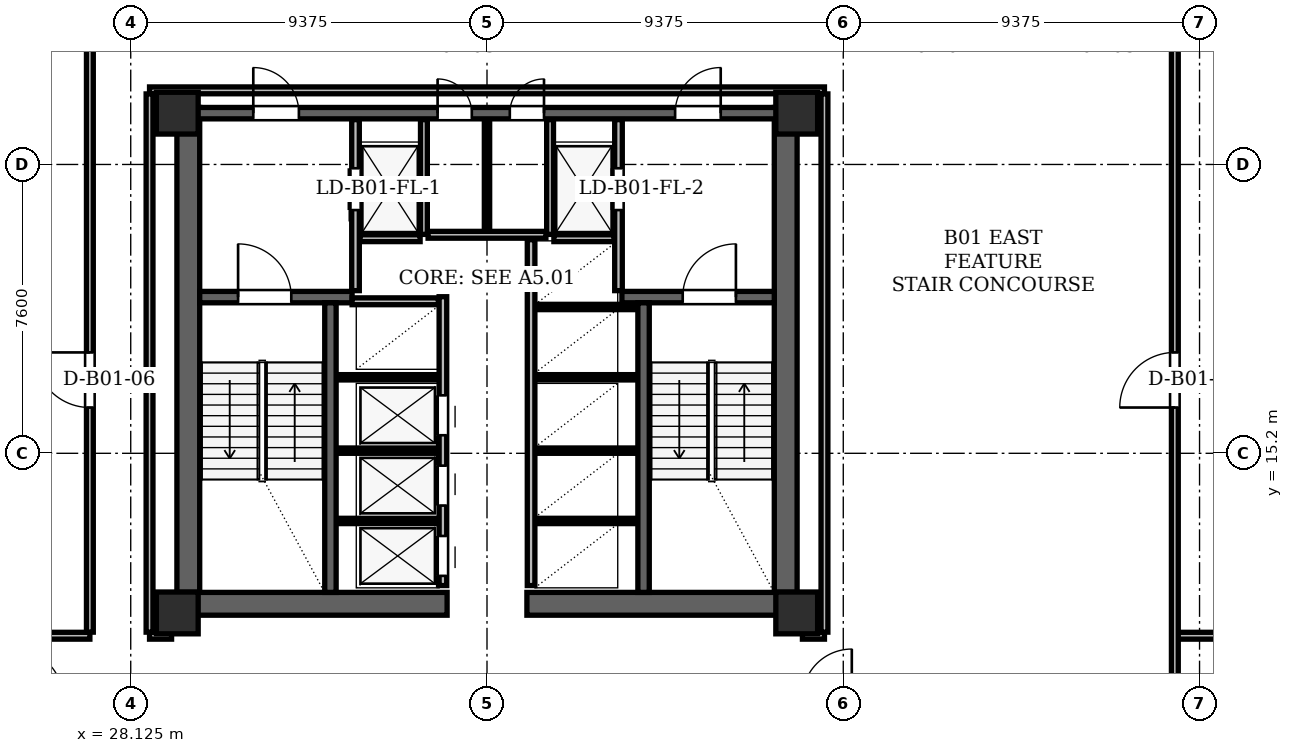
"""IFC4 building model, lengths in metres.
Left out: names, types, materials, properties, quantities, classifications, styles, units other than length and angle.
Written with IfcOpenShell. Run it as: python <this file> out.ifc"""

import sys

from ifc_helpers import new_model, si_unit, direction, frame, frame_2d, origin, origin_2d, place, context, subcontext, project, spatial, rectangle, hollow_rectangle, extrude, element, fill, save


model = new_model("IFC4")
c1 = context("Model", 3, precision=1e-05, world=origin(), true_north=direction((0.0, 1.0)))
c2 = subcontext(c1, "Body", "Model", "MODEL_VIEW")
j1 = project(units=[si_unit("LENGTHUNIT", "METRE"), si_unit("PLANEANGLEUNIT", "RADIAN")], contexts=[c1])
p1 = place(None, origin())
s1 = spatial("IfcSite", under=j1, at=p1, CompositionType="ELEMENT")
p2 = place(p1, origin())
s2 = spatial("IfcBuilding", under=s1, at=p2, CompositionType="ELEMENT")
p3 = place(p2, frame((0.0, 0.0, -4.0)))
s3 = spatial("IfcBuildingStorey", under=s2, at=p3, CompositionType="ELEMENT", Elevation=-4.0)
for number, where, z_axis, x_axis in (
    (1, (29.35, 11.0, 0.0), (0.0, 0.0, 1.0), (1.0, 0.0, 0.0)),
    (2, (45.65, 11.0, 0.0), (0.0, 0.0, 1.0), (1.0, 0.0, 0.0)),
    (3, (45.65, 24.15, 0.0), (0.0, 0.0, 1.0), (1.0, 0.0, 0.0)),
    (4, (29.35, 24.15, 0.0), (0.0, 0.0, 1.0), (1.0, 0.0, 0.0)),
):
    element("IfcColumn", number, at=place(p3, frame(where, z_axis=z_axis, x_axis=x_axis)), inside=s3, PredefinedType="COLUMN", context=c2, shape_type="SweptSolid", body=[
        extrude(hollow_rectangle(XDim=1.1, YDim=1.1, WallThickness=0.09, at=origin_2d()), origin(), (0.0, 0.0, 1.0), 4.0),
    ])
for number, where, z_axis, x_axis in (
    (5, (29.64, 11.0, 0.0), (0.0, 0.0, 1.0), (0.0, 1.0, 0.0)),
    (6, (45.36, 11.0, 0.0), (0.0, 0.0, 1.0), (0.0, 1.0, 0.0)),
):
    element("IfcWall", number, at=place(p3, frame(where, z_axis=z_axis, x_axis=x_axis)), inside=s3, PredefinedType="SHEAR", context=c2, shape_type="SweptSolid", body=[
        extrude(rectangle(XDim=13.3, YDim=0.6, at=frame_2d((6.65, 0.0))), origin(), (0.0, 0.0, 1.0), 3.68),
    ])
for number, where, z_axis, x_axis in (
    (7, (29.35, 11.24, 0.0), (0.0, 0.0, 1.0), (1.0, 0.0, 0.0)),
    (8, (38.55, 11.24, 0.0), (0.0, 0.0, 1.0), (1.0, 0.0, 0.0)),
):
    element("IfcWall", number, at=place(p3, frame(where, z_axis=z_axis, x_axis=x_axis)), inside=s3, PredefinedType="SHEAR", context=c2, shape_type="SweptSolid", body=[
        extrude(rectangle(XDim=7.1, YDim=0.6, at=frame_2d((3.55, 0.0))), origin(), (0.0, 0.0, 1.0), 3.68),
    ])
p4 = place(p3, frame((29.65, 24.15, 0.0), z_axis=(0.0, 0.0, 1.0), x_axis=(1.0, 0.0, 0.0)))
e9 = element("IfcWall", 9, at=p4, inside=s3, PredefinedType="SHEAR", context=c2, shape_type="SweptSolid", body=[
    extrude(rectangle(XDim=15.7, YDim=0.3, at=frame_2d((7.85, 0.0))), origin(), (0.0, 0.0, 1.0), 3.68),
])
p5 = place(p4, frame((1.7, 0.0, 0.0)))
e10 = element("IfcOpeningElement", 10, at=p5, cuts=e9, PredefinedType="OPENING", context=c2, shape_type="SweptSolid", body=[
    extrude(rectangle(XDim=1.2, YDim=2.2, at=frame_2d((0.6, 1.1))), frame((0.0, 0.15, 0.0), z_axis=(0.0, -1.0, 0.0), x_axis=(1.0, 0.0, 0.0)), (0.0, 0.0, 1.0), 0.3),
])
p6 = place(p4, frame((12.8, 0.0, 0.0)))
e11 = element("IfcOpeningElement", 11, at=p6, cuts=e9, PredefinedType="OPENING", context=c2, shape_type="SweptSolid", body=[
    extrude(rectangle(XDim=1.2, YDim=2.2, at=frame_2d((0.6, 1.1))), frame((0.0, 0.15, 0.0), z_axis=(0.0, -1.0, 0.0), x_axis=(1.0, 0.0, 0.0)), (0.0, 0.0, 1.0), 0.3),
])
p7 = place(p4, frame((6.55, 0.0, 0.0)))
e12 = element("IfcOpeningElement", 12, at=p7, cuts=e9, PredefinedType="OPENING", context=c2, shape_type="SweptSolid", body=[
    extrude(rectangle(XDim=0.9, YDim=2.05, at=frame_2d((0.45, 1.025))), frame((0.0, 0.15, 0.0), z_axis=(0.0, -1.0, 0.0), x_axis=(1.0, 0.0, 0.0)), (0.0, 0.0, 1.0), 0.3),
])
p8 = place(p4, frame((8.45, 0.0, 0.0)))
e13 = element("IfcOpeningElement", 13, at=p8, cuts=e9, PredefinedType="OPENING", context=c2, shape_type="SweptSolid", body=[
    extrude(rectangle(XDim=0.9, YDim=2.05, at=frame_2d((0.45, 1.025))), frame((0.0, 0.15, 0.0), z_axis=(0.0, -1.0, 0.0), x_axis=(1.0, 0.0, 0.0)), (0.0, 0.0, 1.0), 0.3),
])
p9 = place(p3, frame((29.94, 19.31, 0.0), z_axis=(0.0, 0.0, 1.0), x_axis=(1.0, 0.0, 0.0)))
e14 = element("IfcWall", 14, at=p9, inside=s3, PredefinedType="SHEAR", context=c2, shape_type="SweptSolid", body=[
    extrude(rectangle(XDim=4.01, YDim=0.3, at=frame_2d((2.005, 0.0))), origin(), (0.0, 0.0, 1.0), 3.68),
])
p10 = place(p9, frame((1.01, 0.0, 0.0)))
e15 = element("IfcOpeningElement", 15, at=p10, cuts=e14, PredefinedType="OPENING", context=c2, shape_type="SweptSolid", body=[
    extrude(rectangle(XDim=1.4, YDim=2.2, at=frame_2d((0.7, 1.1))), frame((0.0, 0.15, 0.0), z_axis=(0.0, -1.0, 0.0), x_axis=(1.0, 0.0, 0.0)), (0.0, 0.0, 1.0), 0.3),
])
p11 = place(p3, frame((41.05, 19.31, 0.0), z_axis=(0.0, 0.0, 1.0), x_axis=(1.0, 0.0, 0.0)))
e16 = element("IfcWall", 16, at=p11, inside=s3, PredefinedType="SHEAR", context=c2, shape_type="SweptSolid", body=[
    extrude(rectangle(XDim=4.01, YDim=0.3, at=frame_2d((2.005, 0.0))), origin(), (0.0, 0.0, 1.0), 3.68),
])
p12 = place(p11, frame((1.6, 0.0, 0.0)))
e17 = element("IfcOpeningElement", 17, at=p12, cuts=e16, PredefinedType="OPENING", context=c2, shape_type="SweptSolid", body=[
    extrude(rectangle(XDim=1.4, YDim=2.2, at=frame_2d((0.7, 1.1))), frame((0.0, 0.15, 0.0), z_axis=(0.0, -1.0, 0.0), x_axis=(1.0, 0.0, 0.0)), (0.0, 0.0, 1.0), 0.3),
])
for number, where, z_axis, x_axis in (
    (18, (33.38, 11.54, 0.0), (0.0, 0.0, 1.0), (0.0, 1.0, 0.0)),
    (19, (41.62, 11.54, 0.0), (0.0, 0.0, 1.0), (0.0, 1.0, 0.0)),
):
    element("IfcWall", number, at=place(p3, frame(where, z_axis=z_axis, x_axis=x_axis)), inside=s3, PredefinedType="SHEAR", context=c2, shape_type="SweptSolid", body=[
        extrude(rectangle(XDim=7.62, YDim=0.3, at=frame_2d((3.81, 0.0))), origin(), (0.0, 0.0, 1.0), 3.68),
    ])
p13 = place(p3, frame((34.04, 19.48, 0.0), z_axis=(0.0, 0.0, 1.0), x_axis=(0.0, 1.0, 0.0)))
e20 = element("IfcWall", 20, at=p13, inside=s3, PredefinedType="PARTITIONING", context=c2, shape_type="SweptSolid", body=[
    extrude(rectangle(XDim=4.5, YDim=0.2, at=frame_2d((2.25, 0.0))), origin(), (0.0, 0.0, 1.0), 2.72),
])
p14 = place(p13, frame((2.12, 0.0, 0.0)))
e21 = element("IfcOpeningElement", 21, at=p14, cuts=e20, PredefinedType="OPENING", context=c2, shape_type="SweptSolid", body=[
    extrude(rectangle(XDim=1.1, YDim=2.2, at=frame_2d((0.55, 1.1))), frame((0.0, 0.1, 0.0), z_axis=(0.0, -1.0, 0.0), x_axis=(1.0, 0.0, 0.0)), (0.0, 0.0, 1.0), 0.2),
])
p15 = place(p3, frame((35.84, 20.96, 0.0), z_axis=(0.0, 0.0, 1.0), x_axis=(0.0, 1.0, 0.0)))
e22 = element("IfcWall", 22, at=p15, inside=s3, PredefinedType="PARTITIONING", context=c2, shape_type="SweptSolid", body=[
    extrude(rectangle(XDim=3.02, YDim=0.18, at=frame_2d((1.51, 0.0))), origin(), (0.0, 0.0, 1.0), 2.72),
])
p16 = place(p3, frame((34.16, 20.86, 0.0), z_axis=(0.0, 0.0, 1.0), x_axis=(1.0, 0.0, 0.0)))
e23 = element("IfcWall", 23, at=p16, inside=s3, PredefinedType="PARTITIONING", context=c2, shape_type="SweptSolid", body=[
    extrude(rectangle(XDim=1.58, YDim=0.18, at=frame_2d((0.79, 0.0))), origin(), (0.0, 0.0, 1.0), 3.68),
])
p17 = place(p3, frame((40.96, 19.48, 0.0), z_axis=(0.0, 0.0, 1.0), x_axis=(0.0, 1.0, 0.0)))
e24 = element("IfcWall", 24, at=p17, inside=s3, PredefinedType="PARTITIONING", context=c2, shape_type="SweptSolid", body=[
    extrude(rectangle(XDim=4.5, YDim=0.2, at=frame_2d((2.25, 0.0))), origin(), (0.0, 0.0, 1.0), 2.72),
])
p18 = place(p17, frame((2.12, 0.0, 0.0)))
e25 = element("IfcOpeningElement", 25, at=p18, cuts=e24, PredefinedType="OPENING", context=c2, shape_type="SweptSolid", body=[
    extrude(rectangle(XDim=1.1, YDim=2.2, at=frame_2d((0.55, 1.1))), frame((0.0, 0.1, 0.0), z_axis=(0.0, -1.0, 0.0), x_axis=(1.0, 0.0, 0.0)), (0.0, 0.0, 1.0), 0.2),
])
p19 = place(p3, frame((39.16, 20.96, 0.0), z_axis=(0.0, 0.0, 1.0), x_axis=(0.0, 1.0, 0.0)))
e26 = element("IfcWall", 26, at=p19, inside=s3, PredefinedType="PARTITIONING", context=c2, shape_type="SweptSolid", body=[
    extrude(rectangle(XDim=3.02, YDim=0.18, at=frame_2d((1.51, 0.0))), origin(), (0.0, 0.0, 1.0), 2.72),
])
p20 = place(p3, frame((39.26, 20.86, 0.0), z_axis=(0.0, 0.0, 1.0), x_axis=(1.0, 0.0, 0.0)))
e27 = element("IfcWall", 27, at=p20, inside=s3, PredefinedType="PARTITIONING", context=c2, shape_type="SweptSolid", body=[
    extrude(rectangle(XDim=1.58, YDim=0.18, at=frame_2d((0.79, 0.0))), origin(), (0.0, 0.0, 1.0), 3.68),
])
p21 = place(p3, frame((36.34, 11.72, 0.0), z_axis=(0.0, 0.0, 1.0), x_axis=(0.0, 1.0, 0.0)))
e28 = element("IfcWall", 28, at=p21, inside=s3, PredefinedType="PARTITIONING", context=c2, shape_type="SweptSolid", body=[
    extrude(rectangle(XDim=7.6, YDim=0.2, at=frame_2d((3.8, 0.0))), origin(), (0.0, 0.0, 1.0), 3.68),
])
p22 = place(p21, frame((0.255, 0.0, 0.0)))
e29 = element("IfcOpeningElement", 29, at=p22, cuts=e28, PredefinedType="OPENING", context=c2, shape_type="SweptSolid", body=[
    extrude(rectangle(XDim=1.05, YDim=2.15, at=frame_2d((0.525, 1.075))), frame((0.0, 0.1, 0.0), z_axis=(0.0, -1.0, 0.0), x_axis=(1.0, 0.0, 0.0)), (0.0, 0.0, 1.0), 0.2),
])
p23 = place(p21, frame((2.105, 0.0, 0.0)))
e30 = element("IfcOpeningElement", 30, at=p23, cuts=e28, PredefinedType="OPENING", context=c2, shape_type="SweptSolid", body=[
    extrude(rectangle(XDim=1.05, YDim=2.15, at=frame_2d((0.525, 1.075))), frame((0.0, 0.1, 0.0), z_axis=(0.0, -1.0, 0.0), x_axis=(1.0, 0.0, 0.0)), (0.0, 0.0, 1.0), 0.2),
])
p24 = place(p21, frame((3.955, 0.0, 0.0)))
e31 = element("IfcOpeningElement", 31, at=p24, cuts=e28, PredefinedType="OPENING", context=c2, shape_type="SweptSolid", body=[
    extrude(rectangle(XDim=1.05, YDim=2.15, at=frame_2d((0.525, 1.075))), frame((0.0, 0.1, 0.0), z_axis=(0.0, -1.0, 0.0), x_axis=(1.0, 0.0, 0.0)), (0.0, 0.0, 1.0), 0.2),
])
p25 = place(p3, frame((33.95, 19.2, 0.0), z_axis=(0.0, 0.0, 1.0), x_axis=(1.0, 0.0, 0.0)))
e32 = element("IfcWall", 32, at=p25, inside=s3, PredefinedType="PARTITIONING", context=c2, shape_type="SweptSolid", body=[
    extrude(rectangle(XDim=2.27, YDim=0.18, at=frame_2d((1.135, 0.0))), origin(), (0.0, 0.0, 1.0), 3.68),
])
for number, where, z_axis, x_axis in (
    (33, (33.56, 13.42, 0.0), (0.0, 0.0, 1.0), (1.0, 0.0, 0.0)),
    (34, (33.56, 15.27, 0.0), (0.0, 0.0, 1.0), (1.0, 0.0, 0.0)),
    (35, (33.56, 17.2, 0.0), (0.0, 0.0, 1.0), (1.0, 0.0, 0.0)),
):
    element("IfcWall", number, at=place(p3, frame(where, z_axis=z_axis, x_axis=x_axis)), inside=s3, PredefinedType="PARTITIONING", context=c2, shape_type="SweptSolid", body=[
        extrude(rectangle(XDim=2.66, YDim=0.14, at=frame_2d((1.33, 0.0))), origin(), (0.0, 0.0, 1.0), 3.68),
    ])
p26 = place(p3, frame((38.66, 11.72, 0.0), z_axis=(0.0, 0.0, 1.0), x_axis=(0.0, 1.0, 0.0)))
e36 = element("IfcWall", 36, at=p26, inside=s3, PredefinedType="PARTITIONING", context=c2, shape_type="SweptSolid", body=[
    extrude(rectangle(XDim=9.1, YDim=0.2, at=frame_2d((4.55, 0.0))), origin(), (0.0, 0.0, 1.0), 3.68),
])
for number, where, z_axis, x_axis in (
    (37, (38.78, 13.42, 0.0), (0.0, 0.0, 1.0), (1.0, 0.0, 0.0)),
    (38, (38.78, 15.27, 0.0), (0.0, 0.0, 1.0), (1.0, 0.0, 0.0)),
    (39, (38.78, 17.2, 0.0), (0.0, 0.0, 1.0), (1.0, 0.0, 0.0)),
    (40, (38.78, 19.05, 0.0), (0.0, 0.0, 1.0), (1.0, 0.0, 0.0)),
):
    element("IfcWall", number, at=place(p3, frame(where, z_axis=z_axis, x_axis=x_axis)), inside=s3, PredefinedType="PARTITIONING", context=c2, shape_type="SweptSolid", body=[
        extrude(rectangle(XDim=2.66, YDim=0.14, at=frame_2d((1.33, 0.0))), origin(), (0.0, 0.0, 1.0), 3.68),
    ])
p27 = place(p3, frame((35.95, 20.95, 0.0), z_axis=(0.0, 0.0, 1.0), x_axis=(1.0, 0.0, 0.0)))
e41 = element("IfcWall", 41, at=p27, inside=s3, PredefinedType="PARTITIONING", context=c2, shape_type="SweptSolid", body=[
    extrude(rectangle(XDim=3.1, YDim=0.18, at=frame_2d((1.55, 0.0))), origin(), (0.0, 0.0, 1.0), 3.68),
])
p28 = place(p3, frame((37.5, 21.06, 0.0), z_axis=(0.0, 0.0, 1.0), x_axis=(0.0, 1.0, 0.0)))
e42 = element("IfcWall", 42, at=p28, inside=s3, PredefinedType="PARTITIONING", context=c2, shape_type="SweptSolid", body=[
    extrude(rectangle(XDim=2.92, YDim=0.14, at=frame_2d((1.46, 0.0))), origin(), (0.0, 0.0, 1.0), 2.72),
])
p29 = place(p3, frame((16.25, 10.4, 0.0), z_axis=(0.0, 0.0, 1.0), x_axis=(1.0, 0.0, 0.0)))
e43 = element("IfcWall", 43, at=p29, inside=s3, PredefinedType="PARTITIONING", context=c2, shape_type="SweptSolid", body=[
    extrude(rectangle(XDim=10.8, YDim=0.18, at=frame_2d((5.4, 0.0))), origin(), (0.0, 0.0, 1.0), 3.68),
])
for number, where, z_axis, x_axis in (
    (44, (28.62, 10.4, 0.0), (0.0, 0.0, 1.0), (1.0, 0.0, 0.0)),
    (45, (45.8, 10.4, 0.0), (0.0, 0.0, 1.0), (1.0, 0.0, 0.0)),
):
    element("IfcWall", number, at=place(p3, frame(where, z_axis=z_axis, x_axis=x_axis)), inside=s3, PredefinedType="PARTITIONING", context=c2, shape_type="SweptSolid", body=[
        extrude(rectangle(XDim=0.58, YDim=0.18, at=frame_2d((0.29, 0.0))), origin(), (0.0, 0.0, 1.0), 2.743),
    ])
p30 = place(p3, frame((55.6, 10.4, 0.0), z_axis=(0.0, 0.0, 1.0), x_axis=(1.0, 0.0, 0.0)))
e46 = element("IfcWall", 46, at=p30, inside=s3, PredefinedType="PARTITIONING", context=c2, shape_type="SweptSolid", body=[
    extrude(rectangle(XDim=22.121, YDim=0.18, at=frame_2d((11.061, 0.0))), origin(), (0.0, 0.0, 1.0), 2.743),
])
p31 = place(p3, frame((28.62, 24.75, 0.0), z_axis=(0.0, 0.0, 1.0), x_axis=(1.0, 0.0, 0.0)))
e47 = element("IfcWall", 47, at=p31, inside=s3, PredefinedType="PARTITIONING", context=c2, shape_type="SweptSolid", body=[
    extrude(rectangle(XDim=17.76, YDim=0.18, at=frame_2d((8.88, 0.0))), origin(), (0.0, 0.0, 1.0), 2.743),
])
p32 = place(p3, frame((27.05, 10.494, 0.0), z_axis=(0.0, 0.0, 1.0), x_axis=(0.0, 1.0, 0.0)))
e48 = element("IfcWall", 48, at=p32, inside=s3, PredefinedType="PARTITIONING", context=c2, shape_type="SweptSolid", body=[
    extrude(rectangle(XDim=28.386, YDim=0.18, at=frame_2d((14.193, 0.0))), origin(), (0.0, 0.0, 1.0), 2.743),
])
p33 = place(p32, frame((5.91, 0.0, 0.0)))
e49 = element("IfcOpeningElement", 49, at=p33, cuts=e48, PredefinedType="OPENING", context=c2, shape_type="SweptSolid", body=[
    extrude(rectangle(XDim=1.45, YDim=2.25, at=frame_2d((0.725, 1.125))), frame((0.0, 0.09, 0.0), z_axis=(0.0, -1.0, 0.0), x_axis=(1.0, 0.0, 0.0)), (0.0, 0.0, 1.0), 0.18),
])
for number, where, z_axis, x_axis in (
    (50, (28.62, 10.494, 0.0), (0.0, 0.0, 1.0), (0.0, 1.0, 0.0)),
    (51, (46.38, 10.494, 0.0), (0.0, 0.0, 1.0), (0.0, 1.0, 0.0)),
):
    element("IfcWall", number, at=place(p3, frame(where, z_axis=z_axis, x_axis=x_axis)), inside=s3, PredefinedType="PARTITIONING", context=c2, shape_type="SweptSolid", body=[
        extrude(rectangle(XDim=14.162, YDim=0.18, at=frame_2d((7.081, 0.0))), origin(), (0.0, 0.0, 1.0), 2.743),
    ])
p34 = place(p3, frame((55.6, 1.679, 0.0), z_axis=(0.0, 0.0, 1.0), x_axis=(0.0, 1.0, 0.0)))
e52 = element("IfcWall", 52, at=p34, inside=s3, PredefinedType="PARTITIONING", context=c2, shape_type="SweptSolid", body=[
    extrude(rectangle(XDim=42.242, YDim=0.18, at=frame_2d((21.121, 0.0))), origin(), (0.0, 0.0, 1.0), 2.47),
])
p35 = place(p34, frame((14.725, 0.0, 0.0)))
e53 = element("IfcOpeningElement", 53, at=p35, cuts=e52, PredefinedType="OPENING", context=c2, shape_type="SweptSolid", body=[
    extrude(rectangle(XDim=1.45, YDim=2.25, at=frame_2d((0.725, 1.125))), frame((0.0, 0.09, 0.0), z_axis=(0.0, -1.0, 0.0), x_axis=(1.0, 0.0, 0.0)), (0.0, 0.0, 1.0), 0.18),
])
p36 = place(p14, origin())
e54 = element("IfcDoor", 54, at=p36, inside=s3, OperationType="SLIDING_TO_LEFT", PredefinedType="DOOR", context=c2, shape_type="SweptSolid", body=[
    extrude(rectangle(XDim=1.1, YDim=2.2, at=frame_2d((0.55, 1.1))), frame((0.0, 0.025, 0.0), z_axis=(0.0, -1.0, 0.0), x_axis=(1.0, 0.0, 0.0)), (0.0, 0.0, 1.0), 0.05),
])
fill(e21, e54)
p37 = place(p18, origin())
e55 = element("IfcDoor", 55, at=p37, inside=s3, OperationType="SLIDING_TO_RIGHT", PredefinedType="DOOR", context=c2, shape_type="SweptSolid", body=[
    extrude(rectangle(XDim=1.1, YDim=2.2, at=frame_2d((0.55, 1.1))), frame((0.0, 0.025, 0.0), z_axis=(0.0, -1.0, 0.0), x_axis=(1.0, 0.0, 0.0)), (0.0, 0.0, 1.0), 0.05),
])
fill(e25, e55)
p38 = place(p22, origin())
e56 = element("IfcDoor", 56, at=p38, inside=s3, OperationType="SLIDING_TO_LEFT", PredefinedType="DOOR", context=c2, shape_type="SweptSolid", body=[
    extrude(rectangle(XDim=1.05, YDim=2.15, at=frame_2d((0.525, 1.075))), frame((0.0, 0.025, 0.0), z_axis=(0.0, -1.0, 0.0), x_axis=(1.0, 0.0, 0.0)), (0.0, 0.0, 1.0), 0.05),
])
fill(e29, e56)
p39 = place(p23, origin())
e57 = element("IfcDoor", 57, at=p39, inside=s3, OperationType="SLIDING_TO_RIGHT", PredefinedType="DOOR", context=c2, shape_type="SweptSolid", body=[
    extrude(rectangle(XDim=1.05, YDim=2.15, at=frame_2d((0.525, 1.075))), frame((0.0, 0.025, 0.0), z_axis=(0.0, -1.0, 0.0), x_axis=(1.0, 0.0, 0.0)), (0.0, 0.0, 1.0), 0.05),
])
fill(e30, e57)
p40 = place(p24, origin())
e58 = element("IfcDoor", 58, at=p40, inside=s3, OperationType="SLIDING_TO_LEFT", PredefinedType="DOOR", context=c2, shape_type="SweptSolid", body=[
    extrude(rectangle(XDim=1.05, YDim=2.15, at=frame_2d((0.525, 1.075))), frame((0.0, 0.025, 0.0), z_axis=(0.0, -1.0, 0.0), x_axis=(1.0, 0.0, 0.0)), (0.0, 0.0, 1.0), 0.05),
])
fill(e31, e58)
p41 = place(p10, origin())
e59 = element("IfcDoor", 59, at=p41, inside=s3, OperationType="SINGLE_SWING_LEFT", PredefinedType="DOOR", context=c2, shape_type="SweptSolid", body=[
    extrude(rectangle(XDim=1.4, YDim=2.2, at=frame_2d((0.7, 1.1))), frame((0.0, 0.025, 0.0), z_axis=(0.0, -1.0, 0.0), x_axis=(1.0, 0.0, 0.0)), (0.0, 0.0, 1.0), 0.05),
])
fill(e15, e59)
p42 = place(p12, origin())
e60 = element("IfcDoor", 60, at=p42, inside=s3, OperationType="SINGLE_SWING_RIGHT", PredefinedType="DOOR", context=c2, shape_type="SweptSolid", body=[
    extrude(rectangle(XDim=1.4, YDim=2.2, at=frame_2d((0.7, 1.1))), frame((0.0, 0.025, 0.0), z_axis=(0.0, -1.0, 0.0), x_axis=(1.0, 0.0, 0.0)), (0.0, 0.0, 1.0), 0.05),
])
fill(e17, e60)
p43 = place(p5, origin())
e61 = element("IfcDoor", 61, at=p43, inside=s3, OperationType="SINGLE_SWING_LEFT", PredefinedType="DOOR", context=c2, shape_type="SweptSolid", body=[
    extrude(rectangle(XDim=1.2, YDim=2.2, at=frame_2d((0.6, 1.1))), frame((0.0, 0.025, 0.0), z_axis=(0.0, -1.0, 0.0), x_axis=(1.0, 0.0, 0.0)), (0.0, 0.0, 1.0), 0.05),
])
fill(e10, e61)
p44 = place(p6, origin())
e62 = element("IfcDoor", 62, at=p44, inside=s3, OperationType="SINGLE_SWING_RIGHT", PredefinedType="DOOR", context=c2, shape_type="SweptSolid", body=[
    extrude(rectangle(XDim=1.2, YDim=2.2, at=frame_2d((0.6, 1.1))), frame((0.0, 0.025, 0.0), z_axis=(0.0, -1.0, 0.0), x_axis=(1.0, 0.0, 0.0)), (0.0, 0.0, 1.0), 0.05),
])
fill(e11, e62)
p45 = place(p7, origin())
e63 = element("IfcDoor", 63, at=p45, inside=s3, OperationType="SINGLE_SWING_LEFT", PredefinedType="DOOR", context=c2, shape_type="SweptSolid", body=[
    extrude(rectangle(XDim=0.9, YDim=2.05, at=frame_2d((0.45, 1.025))), frame((0.0, 0.025, 0.0), z_axis=(0.0, -1.0, 0.0), x_axis=(1.0, 0.0, 0.0)), (0.0, 0.0, 1.0), 0.05),
])
fill(e12, e63)
p46 = place(p8, origin())
e64 = element("IfcDoor", 64, at=p46, inside=s3, OperationType="SINGLE_SWING_RIGHT", PredefinedType="DOOR", context=c2, shape_type="SweptSolid", body=[
    extrude(rectangle(XDim=0.9, YDim=2.05, at=frame_2d((0.45, 1.025))), frame((0.0, 0.025, 0.0), z_axis=(0.0, -1.0, 0.0), x_axis=(1.0, 0.0, 0.0)), (0.0, 0.0, 1.0), 0.05),
])
fill(e13, e64)
p47 = place(p33, origin())
e65 = element("IfcDoor", 65, at=p47, inside=s3, OperationType="SINGLE_SWING_RIGHT", PredefinedType="DOOR", context=c2, shape_type="SweptSolid", body=[
    extrude(rectangle(XDim=1.45, YDim=2.25, at=frame_2d((0.725, 1.125))), frame((0.0, 0.025, 0.0), z_axis=(0.0, -1.0, 0.0), x_axis=(1.0, 0.0, 0.0)), (0.0, 0.0, 1.0), 0.05),
])
fill(e49, e65)
p48 = place(p35, origin())
e66 = element("IfcDoor", 66, at=p48, inside=s3, OperationType="SINGLE_SWING_LEFT", PredefinedType="DOOR", context=c2, shape_type="SweptSolid", body=[
    extrude(rectangle(XDim=1.45, YDim=2.25, at=frame_2d((0.725, 1.125))), frame((0.0, 0.025, 0.0), z_axis=(0.0, -1.0, 0.0), x_axis=(1.0, 0.0, 0.0)), (0.0, 0.0, 1.0), 0.05),
])
fill(e53, e66)
save(model, sys.argv[1])
